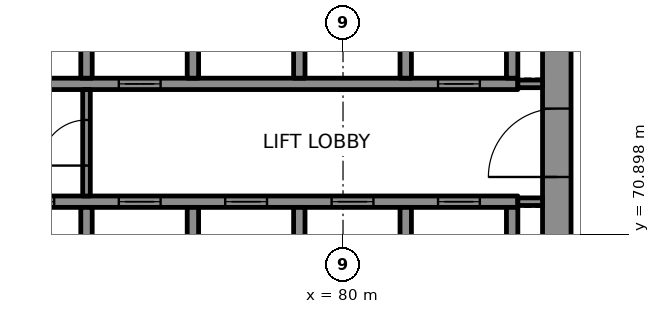
"""IFC4 building model, lengths in metres.
Left out: names, types, materials, properties, quantities, classifications, styles, units other than length and angle.
Written with IfcOpenShell. Run it as: python <this file> out.ifc"""

import sys

from ifc_helpers import new_model, si_unit, direction, frame, frame_2d, origin, place, context, subcontext, project, spatial, rectangle, extrude, element, fill, save


model = new_model("IFC4")
c1 = context("Model", 3, precision=1e-05, world=origin(), true_north=direction((0.0, 1.0)))
c2 = subcontext(c1, "Body", "Model", "MODEL_VIEW")
j1 = project(units=[si_unit("LENGTHUNIT", "METRE"), si_unit("PLANEANGLEUNIT", "RADIAN")], contexts=[c1])
p1 = place(None, origin())
s1 = spatial("IfcSite", under=j1, at=p1, CompositionType="ELEMENT")
p2 = place(p1, origin())
s2 = spatial("IfcBuilding", under=s1, at=p2, CompositionType="ELEMENT")
p3 = place(p2, frame((0.0, 0.0, 179.2)))
s3 = spatial("IfcBuildingStorey", under=s2, at=p3, CompositionType="ELEMENT", Elevation=179.2)
p4 = place(p3, frame((85.625, 67.75, 0.0), z_axis=(0.0, 0.0, 1.0), x_axis=(0.0, 1.0, 0.0)))
e1 = element("IfcWall", 1, at=p4, inside=s3, PredefinedType="SHEAR", context=c2, shape_type="SweptSolid", body=[
    extrude(rectangle(XDim=14.5, YDim=0.75, at=frame_2d((7.25, 0.0))), origin(), (0.0, 0.0, 1.0), 3.7),
])
p5 = place(p4, frame((4.65, 0.0, 0.0)))
e2 = element("IfcOpeningElement", 2, at=p5, cuts=e1, PredefinedType="OPENING", context=c2, shape_type="SweptSolid", body=[
    extrude(rectangle(XDim=1.8, YDim=2.1, at=frame_2d((0.9, 1.05))), frame((0.0, 0.385, 0.0), z_axis=(0.0, -1.0, 0.0), x_axis=(1.0, 0.0, 0.0)), (0.0, 0.0, 1.0), 0.77),
])
p6 = place(p4, frame((11.8, 0.0, 0.0)))
e3 = element("IfcOpeningElement", 3, at=p6, cuts=e1, PredefinedType="OPENING", context=c2, shape_type="SweptSolid", body=[
    extrude(rectangle(XDim=0.9, YDim=2.1, at=frame_2d((0.45, 1.05))), frame((0.0, 0.385, 0.0), z_axis=(0.0, -1.0, 0.0), x_axis=(1.0, 0.0, 0.0)), (0.0, 0.0, 1.0), 0.77),
])
p7 = place(p3, frame((70.3, 71.75, 0.0), z_axis=(0.0, 0.0, 1.0), x_axis=(1.0, 0.0, 0.0)))
e4 = element("IfcWall", 4, at=p7, inside=s3, PredefinedType="SHEAR", context=c2, shape_type="SweptSolid", body=[
    extrude(rectangle(XDim=14.3, YDim=0.3, at=frame_2d((7.15, 0.0))), origin(), (0.0, 0.0, 1.0), 3.7),
])
p8 = place(p7, frame((1.0, 0.0, 0.0)))
e5 = element("IfcOpeningElement", 5, at=p8, cuts=e4, PredefinedType="OPENING", context=c2, shape_type="SweptSolid", body=[
    extrude(rectangle(XDim=1.1, YDim=2.1, at=frame_2d((0.55, 1.05))), frame((0.0, 0.16, 0.0), z_axis=(0.0, -1.0, 0.0), x_axis=(1.0, 0.0, 0.0)), (0.0, 0.0, 1.0), 0.32),
])
p9 = place(p7, frame((3.8, 0.0, 0.0)))
e6 = element("IfcOpeningElement", 6, at=p9, cuts=e4, PredefinedType="OPENING", context=c2, shape_type="SweptSolid", body=[
    extrude(rectangle(XDim=1.1, YDim=2.1, at=frame_2d((0.55, 1.05))), frame((0.0, 0.16, 0.0), z_axis=(0.0, -1.0, 0.0), x_axis=(1.0, 0.0, 0.0)), (0.0, 0.0, 1.0), 0.32),
])
p10 = place(p7, frame((6.6, 0.0, 0.0)))
e7 = element("IfcOpeningElement", 7, at=p10, cuts=e4, PredefinedType="OPENING", context=c2, shape_type="SweptSolid", body=[
    extrude(rectangle(XDim=1.1, YDim=2.1, at=frame_2d((0.55, 1.05))), frame((0.0, 0.16, 0.0), z_axis=(0.0, -1.0, 0.0), x_axis=(1.0, 0.0, 0.0)), (0.0, 0.0, 1.0), 0.32),
])
p11 = place(p7, frame((9.4, 0.0, 0.0)))
e8 = element("IfcOpeningElement", 8, at=p11, cuts=e4, PredefinedType="OPENING", context=c2, shape_type="SweptSolid", body=[
    extrude(rectangle(XDim=1.1, YDim=2.1, at=frame_2d((0.55, 1.05))), frame((0.0, 0.16, 0.0), z_axis=(0.0, -1.0, 0.0), x_axis=(1.0, 0.0, 0.0)), (0.0, 0.0, 1.0), 0.32),
])
p12 = place(p7, frame((12.2, 0.0, 0.0)))
e9 = element("IfcOpeningElement", 9, at=p12, cuts=e4, PredefinedType="OPENING", context=c2, shape_type="SweptSolid", body=[
    extrude(rectangle(XDim=1.1, YDim=2.1, at=frame_2d((0.55, 1.05))), frame((0.0, 0.16, 0.0), z_axis=(0.0, -1.0, 0.0), x_axis=(1.0, 0.0, 0.0)), (0.0, 0.0, 1.0), 0.32),
])
p13 = place(p3, frame((70.3, 74.85, 0.0), z_axis=(0.0, 0.0, 1.0), x_axis=(1.0, 0.0, 0.0)))
e10 = element("IfcWall", 10, at=p13, inside=s3, PredefinedType="SHEAR", context=c2, shape_type="SweptSolid", body=[
    extrude(rectangle(XDim=14.3, YDim=0.3, at=frame_2d((7.15, 0.0))), origin(), (0.0, 0.0, 1.0), 3.7),
])
p14 = place(p13, frame((3.8, 0.0, 0.0)))
e11 = element("IfcOpeningElement", 11, at=p14, cuts=e10, PredefinedType="OPENING", context=c2, shape_type="SweptSolid", body=[
    extrude(rectangle(XDim=1.1, YDim=2.1, at=frame_2d((0.55, 1.05))), frame((0.0, 0.16, 0.0), z_axis=(0.0, -1.0, 0.0), x_axis=(1.0, 0.0, 0.0)), (0.0, 0.0, 1.0), 0.32),
])
p15 = place(p13, frame((12.2, 0.0, 0.0)))
e12 = element("IfcOpeningElement", 12, at=p15, cuts=e10, PredefinedType="OPENING", context=c2, shape_type="SweptSolid", body=[
    extrude(rectangle(XDim=1.1, YDim=2.1, at=frame_2d((0.55, 1.05))), frame((0.0, 0.16, 0.0), z_axis=(0.0, -1.0, 0.0), x_axis=(1.0, 0.0, 0.0)), (0.0, 0.0, 1.0), 0.32),
])
for number, where, z_axis, x_axis in (
    (13, (73.25, 69.0, 0.0), (0.0, 0.0, 1.0), (0.0, 1.0, 0.0)),
    (14, (73.25, 75.0, 0.0), (0.0, 0.0, 1.0), (0.0, 1.0, 0.0)),
    (15, (76.05, 69.0, 0.0), (0.0, 0.0, 1.0), (0.0, 1.0, 0.0)),
    (16, (76.05, 75.0, 0.0), (0.0, 0.0, 1.0), (0.0, 1.0, 0.0)),
    (17, (78.85, 69.0, 0.0), (0.0, 0.0, 1.0), (0.0, 1.0, 0.0)),
    (18, (78.85, 75.0, 0.0), (0.0, 0.0, 1.0), (0.0, 1.0, 0.0)),
    (19, (81.65, 69.0, 0.0), (0.0, 0.0, 1.0), (0.0, 1.0, 0.0)),
    (20, (81.65, 75.0, 0.0), (0.0, 0.0, 1.0), (0.0, 1.0, 0.0)),
    (21, (84.45, 69.0, 0.0), (0.0, 0.0, 1.0), (0.0, 1.0, 0.0)),
    (22, (84.45, 75.0, 0.0), (0.0, 0.0, 1.0), (0.0, 1.0, 0.0)),
):
    element("IfcWall", number, at=place(p3, frame(where, z_axis=z_axis, x_axis=x_axis)), inside=s3, PredefinedType="SHEAR", context=c2, shape_type="SweptSolid", body=[
        extrude(rectangle(XDim=2.6, YDim=0.3, at=frame_2d((1.3, 0.0))), origin(), (0.0, 0.0, 1.0), 3.7),
    ])
for number, where, z_axis, x_axis in (
    (23, (84.6, 71.75, 0.0), (0.0, 0.0, 1.0), (1.0, 0.0, 0.0)),
    (24, (84.6, 74.85, 0.0), (0.0, 0.0, 1.0), (1.0, 0.0, 0.0)),
):
    element("IfcWall", number, at=place(p3, frame(where, z_axis=z_axis, x_axis=x_axis)), inside=s3, PredefinedType="PARTITIONING", context=c2, shape_type="SweptSolid", body=[
        extrude(rectangle(XDim=0.65, YDim=0.2, at=frame_2d((0.325, 0.0))), origin(), (0.0, 0.0, 1.0), 3.7),
    ])
p16 = place(p3, frame((73.25, 71.9, 0.0), z_axis=(0.0, 0.0, 1.0), x_axis=(0.0, 1.0, 0.0)))
e25 = element("IfcWall", 25, at=p16, inside=s3, PredefinedType="PARTITIONING", context=c2, shape_type="SweptSolid", body=[
    extrude(rectangle(XDim=2.8, YDim=0.2, at=frame_2d((1.4, 0.0))), origin(), (0.0, 0.0, 1.0), 3.7),
])
p17 = place(p16, frame((0.8, 0.0, 0.0)))
e26 = element("IfcOpeningElement", 26, at=p17, cuts=e25, PredefinedType="OPENING", context=c2, shape_type="SweptSolid", body=[
    extrude(rectangle(XDim=1.2, YDim=2.1, at=frame_2d((0.6, 1.05))), frame((0.0, 0.11, 0.0), z_axis=(0.0, -1.0, 0.0), x_axis=(1.0, 0.0, 0.0)), (0.0, 0.0, 1.0), 0.22),
])
p18 = place(p8, origin())
e27 = element("IfcDoor", 27, at=p18, inside=s3, OperationType="DOUBLE_DOOR_SLIDING", PredefinedType="DOOR", context=c2, shape_type="SweptSolid", body=[
    extrude(rectangle(XDim=1.1, YDim=2.1, at=frame_2d((0.55, 1.05))), frame((0.0, 0.025, 0.0), z_axis=(0.0, -1.0, 0.0), x_axis=(1.0, 0.0, 0.0)), (0.0, 0.0, 1.0), 0.05),
])
fill(e5, e27)
p19 = place(p9, origin())
e28 = element("IfcDoor", 28, at=p19, inside=s3, OperationType="DOUBLE_DOOR_SLIDING", PredefinedType="DOOR", context=c2, shape_type="SweptSolid", body=[
    extrude(rectangle(XDim=1.1, YDim=2.1, at=frame_2d((0.55, 1.05))), frame((0.0, 0.025, 0.0), z_axis=(0.0, -1.0, 0.0), x_axis=(1.0, 0.0, 0.0)), (0.0, 0.0, 1.0), 0.05),
])
fill(e6, e28)
p20 = place(p10, origin())
e29 = element("IfcDoor", 29, at=p20, inside=s3, OperationType="DOUBLE_DOOR_SLIDING", PredefinedType="DOOR", context=c2, shape_type="SweptSolid", body=[
    extrude(rectangle(XDim=1.1, YDim=2.1, at=frame_2d((0.55, 1.05))), frame((0.0, 0.025, 0.0), z_axis=(0.0, -1.0, 0.0), x_axis=(1.0, 0.0, 0.0)), (0.0, 0.0, 1.0), 0.05),
])
fill(e7, e29)
p21 = place(p11, origin())
e30 = element("IfcDoor", 30, at=p21, inside=s3, OperationType="DOUBLE_DOOR_SLIDING", PredefinedType="DOOR", context=c2, shape_type="SweptSolid", body=[
    extrude(rectangle(XDim=1.1, YDim=2.1, at=frame_2d((0.55, 1.05))), frame((0.0, 0.025, 0.0), z_axis=(0.0, -1.0, 0.0), x_axis=(1.0, 0.0, 0.0)), (0.0, 0.0, 1.0), 0.05),
])
fill(e8, e30)
p22 = place(p12, origin())
e31 = element("IfcDoor", 31, at=p22, inside=s3, OperationType="DOUBLE_DOOR_SLIDING", PredefinedType="DOOR", context=c2, shape_type="SweptSolid", body=[
    extrude(rectangle(XDim=1.1, YDim=2.1, at=frame_2d((0.55, 1.05))), frame((0.0, 0.025, 0.0), z_axis=(0.0, -1.0, 0.0), x_axis=(1.0, 0.0, 0.0)), (0.0, 0.0, 1.0), 0.05),
])
fill(e9, e31)
p23 = place(p14, origin())
e32 = element("IfcDoor", 32, at=p23, inside=s3, OperationType="DOUBLE_DOOR_SLIDING", PredefinedType="DOOR", context=c2, shape_type="SweptSolid", body=[
    extrude(rectangle(XDim=1.1, YDim=2.1, at=frame_2d((0.55, 1.05))), frame((0.0, 0.025, 0.0), z_axis=(0.0, -1.0, 0.0), x_axis=(1.0, 0.0, 0.0)), (0.0, 0.0, 1.0), 0.05),
])
fill(e11, e32)
p24 = place(p15, origin())
e33 = element("IfcDoor", 33, at=p24, inside=s3, OperationType="DOUBLE_DOOR_SLIDING", PredefinedType="DOOR", context=c2, shape_type="SweptSolid", body=[
    extrude(rectangle(XDim=1.1, YDim=2.1, at=frame_2d((0.55, 1.05))), frame((0.0, 0.025, 0.0), z_axis=(0.0, -1.0, 0.0), x_axis=(1.0, 0.0, 0.0)), (0.0, 0.0, 1.0), 0.05),
])
fill(e12, e33)
p25 = place(p17, origin())
e34 = element("IfcDoor", 34, at=p25, inside=s3, OperationType="SINGLE_SWING_LEFT", PredefinedType="DOOR", context=c2, shape_type="SweptSolid", body=[
    extrude(rectangle(XDim=1.2, YDim=2.1, at=frame_2d((0.6, 1.05))), frame((0.0, 0.025, 0.0), z_axis=(0.0, -1.0, 0.0), x_axis=(1.0, 0.0, 0.0)), (0.0, 0.0, 1.0), 0.05),
])
fill(e26, e34)
p26 = place(p5, origin())
e35 = element("IfcDoor", 35, at=p26, inside=s3, OperationType="SINGLE_SWING_RIGHT", PredefinedType="DOOR", context=c2, shape_type="SweptSolid", body=[
    extrude(rectangle(XDim=1.8, YDim=2.1, at=frame_2d((0.9, 1.05))), frame((0.0, 0.095, 0.0), z_axis=(0.0, -1.0, 0.0), x_axis=(1.0, 0.0, 0.0)), (0.0, 0.0, 1.0), 0.19),
])
fill(e2, e35)
save(model, sys.argv[1])
